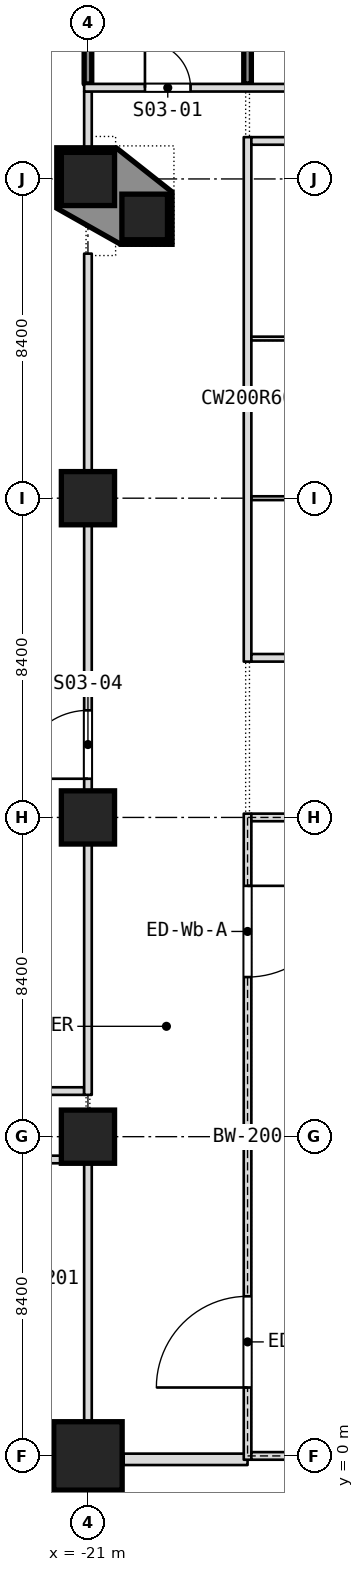
"""IFC4 building model, lengths in metres.
Left out: names, types, materials, properties, quantities, classifications, styles, units other than length and angle.
Written with IfcOpenShell. Run it as: python <this file> out.ifc"""

import sys

from ifc_helpers import new_model, si_unit, direction, frame, frame_2d, origin, origin_2d, place, context, subcontext, project, spatial, polyline, rectangle, outline, extrude, element, fill, save


model = new_model("IFC4")
c1 = context("Model", 3, precision=1e-05, world=origin(), true_north=direction((0.0, 1.0)))
c2 = subcontext(c1, "Body", "Model", "MODEL_VIEW")
j1 = project(units=[si_unit("LENGTHUNIT", "METRE"), si_unit("PLANEANGLEUNIT", "RADIAN")], contexts=[c1])
p1 = place(None, origin())
s1 = spatial("IfcSite", under=j1, at=p1, CompositionType="ELEMENT")
p2 = place(p1, origin())
s2 = spatial("IfcBuilding", under=s1, at=p2, CompositionType="ELEMENT")
p3 = place(p2, frame((0.0, 0.0, 13.0)))
s3 = spatial("IfcBuildingStorey", under=s2, at=p3, CompositionType="ELEMENT", Elevation=13.0)
p4 = place(p3, frame((-21.0, 0.0, 0.0), z_axis=(0.0, 0.0, 1.0), x_axis=(1.0, 0.0, 0.0)))
e1 = element("IfcColumn", 1, at=p4, inside=s3, PredefinedType="COLUMN", context=c2, shape_type="SweptSolid", body=[
    extrude(rectangle(XDim=1.8, YDim=1.8, at=origin_2d()), origin(), (0.0, 0.0, 1.0), 8.0),
])
for number, where, z_axis, x_axis in (
    (2, (-21.0, 8.4, 0.0), (0.0, 0.0, 1.0), (1.0, 0.0, 0.0)),
    (3, (-21.0, 16.8, 0.0), (0.0, 0.0, 1.0), (1.0, 0.0, 0.0)),
    (4, (-21.0, 25.2, 0.0), (0.0, 0.0, 1.0), (1.0, 0.0, 0.0)),
    (5, (-21.0, 33.6, 0.0), (0.0, 0.0, 1.0), (1.0, 0.0, 0.0)),
):
    element("IfcColumn", number, at=place(p3, frame(where, z_axis=z_axis, x_axis=x_axis)), inside=s3, PredefinedType="COLUMN", context=c2, shape_type="SweptSolid", body=[
        extrude(rectangle(XDim=1.4, YDim=1.4, at=origin_2d()), origin(), (0.0, 0.0, 1.0), 8.0),
    ])
p5 = place(p3, frame((-19.507, 32.6, 0.0), z_axis=(0.0, 0.0, 1.0), x_axis=(1.0, 0.0, 0.0)))
e6 = element("IfcColumn", 6, at=p5, inside=s3, PredefinedType="COLUMN", context=c2, shape_type="SweptSolid", body=[
    extrude(rectangle(XDim=1.2, YDim=1.2, at=origin_2d()), origin(), (0.0, 0.0, 1.0), 8.0),
])
p6 = place(p3, frame((-38.1, 7.8, 0.0), z_axis=(0.0, 0.0, 1.0), x_axis=(1.0, 0.0, 0.0)))
e7 = element("IfcWall", 7, at=p6, inside=s3, PredefinedType="PARTITIONING", context=c2, shape_type="SweptSolid", body=[
    extrude(rectangle(XDim=17.0, YDim=0.2, at=frame_2d((8.5, 0.0))), origin(), (0.0, 0.0, 1.0), 7.68),
])
p7 = place(p6, frame((11.125, 0.0, 0.0)))
e8 = element("IfcOpeningElement", 8, at=p7, cuts=e7, PredefinedType="OPENING", context=c2, shape_type="SweptSolid", body=[
    extrude(rectangle(XDim=1.8, YDim=2.1, at=frame_2d((0.9, 1.05))), frame((0.0, 0.1, 0.0), z_axis=(0.0, -1.0, 0.0), x_axis=(1.0, 0.0, 0.0)), (0.0, 0.0, 1.0), 0.2),
])
p8 = place(p3, frame((-27.3, 9.6, 0.0), z_axis=(0.0, 0.0, 1.0), x_axis=(1.0, 0.0, 0.0)))
e9 = element("IfcWall", 9, at=p8, inside=s3, PredefinedType="PARTITIONING", context=c2, shape_type="SweptSolid", body=[
    extrude(rectangle(XDim=6.2, YDim=0.2, at=frame_2d((3.1, 0.0))), origin(), (0.0, 0.0, 1.0), 7.68),
])
p9 = place(p3, frame((-16.8, 20.9, 0.0), z_axis=(0.0, 0.0, 1.0), x_axis=(0.0, 1.0, 0.0)))
e10 = element("IfcWall", 10, at=p9, inside=s3, PredefinedType="PARTITIONING", context=c2, shape_type="SweptSolid", body=[
    extrude(rectangle(XDim=13.8, YDim=0.2, at=frame_2d((6.9, 0.0))), origin(), (0.0, 0.0, 1.0), 7.68),
])
p10 = place(p3, frame((-16.8, 36.1, 0.0), z_axis=(0.0, 0.0, 1.0), x_axis=(0.0, 1.0, 0.0)))
e11 = element("IfcWall", 11, at=p10, inside=s3, PredefinedType="PARTITIONING", context=c2, shape_type="SweptSolid", body=[
    extrude(rectangle(XDim=5.84, YDim=0.2, at=frame_2d((2.92, 0.0))), origin(), (0.0, 0.0, 1.0), 7.68),
])
p11 = place(p3, frame((-21.0, -0.3, 0.0), z_axis=(0.0, 0.0, 1.0), x_axis=(0.0, 1.0, 0.0)))
e12 = element("IfcWall", 12, at=p11, inside=s3, PredefinedType="PARTITIONING", context=c2, shape_type="SweptSolid", body=[
    extrude(rectangle(XDim=8.2, YDim=0.2, at=frame_2d((4.1, 0.0))), origin(), (0.0, 0.0, 1.0), 7.68),
])
p12 = place(p3, frame((-21.0, 9.5, 0.0), z_axis=(0.0, 0.0, 1.0), x_axis=(0.0, 1.0, 0.0)))
e13 = element("IfcWall", 13, at=p12, inside=s3, PredefinedType="PARTITIONING", context=c2, shape_type="SweptSolid", body=[
    extrude(rectangle(XDim=22.135, YDim=0.2, at=frame_2d((11.067, 0.0))), origin(), (0.0, 0.0, 1.0), 7.68),
])
p13 = place(p12, frame((8.318, 0.0, 0.0)))
e14 = element("IfcOpeningElement", 14, at=p13, cuts=e13, PredefinedType="OPENING", context=c2, shape_type="SweptSolid", body=[
    extrude(rectangle(XDim=1.8, YDim=2.1, at=frame_2d((0.9, 1.05))), frame((0.0, 0.1, 0.0), z_axis=(0.0, -1.0, 0.0), x_axis=(1.0, 0.0, 0.0)), (0.0, 0.0, 1.0), 0.2),
])
p14 = place(p3, frame((-21.0, 34.42, 0.0), z_axis=(0.0, 0.0, 1.0), x_axis=(0.0, 1.0, 0.0)))
e15 = element("IfcWall", 15, at=p14, inside=s3, PredefinedType="PARTITIONING", context=c2, shape_type="SweptSolid", body=[
    extrude(rectangle(XDim=1.48, YDim=0.2, at=frame_2d((0.74, 0.0))), origin(), (0.0, 0.0, 1.0), 7.68),
])
p15 = place(p3, frame((-21.0, 36.1, 0.0), z_axis=(0.0, 0.0, 1.0), x_axis=(0.0, 1.0, 0.0)))
e16 = element("IfcWall", 16, at=p15, inside=s3, PredefinedType="PARTITIONING", context=c2, shape_type="SweptSolid", body=[
    extrude(rectangle(XDim=6.2, YDim=0.2, at=frame_2d((3.1, 0.0))), origin(), (0.0, 0.0, 1.0), 7.68),
])
p16 = place(p3, frame((-16.7, 21.0, 0.0), z_axis=(0.0, 0.0, 1.0), x_axis=(1.0, 0.0, 0.0)))
e17 = element("IfcWall", 17, at=p16, inside=s3, PredefinedType="PARTITIONING", context=c2, shape_type="SweptSolid", body=[
    extrude(rectangle(XDim=33.4, YDim=0.2, at=frame_2d((16.7, 0.0))), origin(), (0.0, 0.0, 1.0), 7.68),
])
p17 = place(p16, frame((15.8, 0.0, 0.0)))
e18 = element("IfcOpeningElement", 18, at=p17, cuts=e17, PredefinedType="OPENING", context=c2, shape_type="SweptSolid", body=[
    extrude(rectangle(XDim=1.8, YDim=2.1, at=frame_2d((0.9, 1.05))), frame((0.0, 0.1, 0.0), z_axis=(0.0, -1.0, 0.0), x_axis=(1.0, 0.0, 0.0)), (0.0, 0.0, 1.0), 0.2),
])
p18 = place(p3, frame((-16.7, 25.2, 0.0), z_axis=(0.0, 0.0, 1.0), x_axis=(1.0, 0.0, 0.0)))
e19 = element("IfcWall", 19, at=p18, inside=s3, PredefinedType="PARTITIONING", context=c2, shape_type="SweptSolid", body=[
    extrude(rectangle(XDim=3.38, YDim=0.1, at=frame_2d((1.69, 0.0))), origin(), (0.0, 0.0, 1.0), 7.68),
])
p19 = place(p3, frame((-16.7, 29.4, 0.0), z_axis=(0.0, 0.0, 1.0), x_axis=(1.0, 0.0, 0.0)))
e20 = element("IfcWall", 20, at=p19, inside=s3, PredefinedType="PARTITIONING", context=c2, shape_type="SweptSolid", body=[
    extrude(rectangle(XDim=33.4, YDim=0.1, at=frame_2d((16.7, 0.0))), origin(), (0.0, 0.0, 1.0), 7.68),
])
p20 = place(p19, frame((16.2, 0.0, 0.0)))
e21 = element("IfcOpeningElement", 21, at=p20, cuts=e20, PredefinedType="OPENING", context=c2, shape_type="SweptSolid", body=[
    extrude(rectangle(XDim=1.0, YDim=2.1, at=frame_2d((0.5, 1.05))), frame((0.0, 0.05, 0.0), z_axis=(0.0, -1.0, 0.0), x_axis=(1.0, 0.0, 0.0)), (0.0, 0.0, 1.0), 0.1),
])
p21 = place(p3, frame((-16.7, 34.6, 0.0), z_axis=(0.0, 0.0, 1.0), x_axis=(1.0, 0.0, 0.0)))
e22 = element("IfcWall", 22, at=p21, inside=s3, PredefinedType="PARTITIONING", context=c2, shape_type="SweptSolid", body=[
    extrude(rectangle(XDim=3.23, YDim=0.2, at=frame_2d((1.615, 0.0))), origin(), (0.0, 0.0, 1.0), 7.68),
])
p22 = place(p3, frame((-21.1, 36.0, 0.0), z_axis=(0.0, 0.0, 1.0), x_axis=(1.0, 0.0, 0.0)))
e23 = element("IfcWall", 23, at=p22, inside=s3, PredefinedType="PARTITIONING", context=c2, shape_type="SweptSolid", body=[
    extrude(rectangle(XDim=23.3, YDim=0.2, at=frame_2d((11.65, 0.0))), origin(), (0.0, 0.0, 1.0), 7.68),
])
p23 = place(p22, frame((1.6, 0.0, 0.0)))
e24 = element("IfcOpeningElement", 24, at=p23, cuts=e23, PredefinedType="OPENING", context=c2, shape_type="SweptSolid", body=[
    extrude(rectangle(XDim=1.2, YDim=2.1, at=frame_2d((0.6, 1.05))), frame((0.0, 0.1, 0.0), z_axis=(0.0, -1.0, 0.0), x_axis=(1.0, 0.0, 0.0)), (0.0, 0.0, 1.0), 0.2),
])
p24 = place(p22, frame((11.15, 0.0, 0.0)))
e25 = element("IfcOpeningElement", 25, at=p24, cuts=e23, PredefinedType="OPENING", context=c2, shape_type="SweptSolid", body=[
    extrude(rectangle(XDim=1.0, YDim=2.1, at=frame_2d((0.5, 1.05))), frame((0.0, 0.1, 0.0), z_axis=(0.0, -1.0, 0.0), x_axis=(1.0, 0.0, 0.0)), (0.0, 0.0, 1.0), 0.2),
])
p25 = place(p22, frame((20.5, 0.0, 0.0)))
e26 = element("IfcOpeningElement", 26, at=p25, cuts=e23, PredefinedType="OPENING", context=c2, shape_type="SweptSolid", body=[
    extrude(rectangle(XDim=1.2, YDim=2.1, at=frame_2d((0.6, 1.05))), frame((0.0, 0.1, 0.0), z_axis=(0.0, -1.0, 0.0), x_axis=(1.0, 0.0, 0.0)), (0.0, 0.0, 1.0), 0.2),
])
p26 = place(p3, frame((-26.423, -0.09, 0.0), z_axis=(0.0, 0.0, 1.0), x_axis=(1.0, 0.0, 0.0)))
e27 = element("IfcWall", 27, at=p26, inside=s3, PredefinedType="NOTDEFINED", context=c2, shape_type="SweptSolid", body=[
    extrude(rectangle(XDim=4.483, YDim=0.3, at=frame_2d((2.242, 0.0))), origin(), (0.0, 0.0, 1.0), 6.78),
])
p27 = place(p3, frame((-20.06, -0.09, 0.0), z_axis=(0.0, 0.0, 1.0), x_axis=(1.0, 0.0, 0.0)))
e28 = element("IfcWall", 28, at=p27, inside=s3, PredefinedType="NOTDEFINED", context=c2, shape_type="SweptSolid", body=[
    extrude(rectangle(XDim=3.26, YDim=0.3, at=frame_2d((1.63, 0.0))), origin(), (0.0, 0.0, 1.0), 8.0),
])
p28 = place(p3, frame((-16.8, -0.1, 0.0), z_axis=(0.0, 0.0, 1.0), x_axis=(0.0, 1.0, 0.0)))
e29 = element("IfcWall", 29, at=p28, inside=s3, PredefinedType="PARTITIONING", context=c2, shape_type="SweptSolid", body=[
    extrude(rectangle(XDim=17.0, YDim=0.2, at=frame_2d((8.5, 0.0))), origin(), (0.0, 0.0, 1.0), 7.78),
])
p29 = place(p28, frame((1.9, 0.0, 0.0)))
e30 = element("IfcOpeningElement", 30, at=p29, cuts=e29, PredefinedType="OPENING", context=c2, shape_type="SweptSolid", body=[
    extrude(rectangle(XDim=2.4, YDim=2.1, at=frame_2d((1.2, 1.05))), frame((0.0, 0.1, 0.0), z_axis=(0.0, -1.0, 0.0), x_axis=(1.0, 0.0, 0.0)), (0.0, 0.0, 1.0), 0.2),
])
p30 = place(p28, frame((12.7, 0.0, 0.0)))
e31 = element("IfcOpeningElement", 31, at=p30, cuts=e29, PredefinedType="OPENING", context=c2, shape_type="SweptSolid", body=[
    extrude(rectangle(XDim=2.4, YDim=2.1, at=frame_2d((1.2, 1.05))), frame((0.0, 0.1, 0.0), z_axis=(0.0, -1.0, 0.0), x_axis=(1.0, 0.0, 0.0)), (0.0, 0.0, 1.0), 0.2),
])
for number, where, z_axis, x_axis in (
    (32, (-16.7, 0.0, 0.0), (0.0, 0.0, 1.0), (1.0, 0.0, 0.0)),
    (33, (-16.7, 16.8, 0.0), (0.0, 0.0, 1.0), (1.0, 0.0, 0.0)),
):
    element("IfcWall", number, at=place(p3, frame(where, z_axis=z_axis, x_axis=x_axis)), inside=s3, PredefinedType="PARTITIONING", context=c2, shape_type="SweptSolid", body=[
        extrude(rectangle(XDim=4.1, YDim=0.2, at=frame_2d((2.05, 0.0))), origin(), (0.0, 0.0, 1.0), 7.78),
    ])
p31 = place(p3, origin())
e34 = element("IfcWall", 34, at=p31, inside=s3, PredefinedType="SOLIDWALL", context=c2, shape_type="SweptSolid", body=[
    extrude(outline(polyline([(-21.82, 34.42), (-20.258, 34.42), (-18.787, 33.258), (-18.787, 31.88), (-20.138, 31.88), (-21.82, 32.83), (-21.82, 34.42)]), holes=[polyline([(-18.907, 32.0), (-18.907, 33.2), (-20.107, 33.2), (-20.107, 32.0), (-18.907, 32.0)]), polyline([(-20.3, 32.9), (-20.3, 34.3), (-21.7, 34.3), (-21.7, 32.9), (-20.3, 32.9)])]), origin(), (0.0, 0.0, 1.0), 8.0),
])
p32 = place(p23, origin())
e35 = element("IfcDoor", 35, at=p32, inside=s3, OperationType="SINGLE_SWING_RIGHT", PredefinedType="DOOR", context=c2, shape_type="SweptSolid", body=[
    extrude(rectangle(XDim=1.2, YDim=2.1, at=frame_2d((0.6, 1.05))), frame((0.0, 0.025, 0.0), z_axis=(0.0, -1.0, 0.0), x_axis=(1.0, 0.0, 0.0)), (0.0, 0.0, 1.0), 0.05),
])
fill(e24, e35)
p33 = place(p13, origin())
e36 = element("IfcDoor", 36, at=p33, inside=s3, OperationType="DOUBLE_DOOR_SINGLE_SWING", PredefinedType="DOOR", context=c2, shape_type="SweptSolid", body=[
    extrude(rectangle(XDim=1.8, YDim=2.1, at=frame_2d((0.9, 1.05))), frame((0.0, 0.025, 0.0), z_axis=(0.0, -1.0, 0.0), x_axis=(1.0, 0.0, 0.0)), (0.0, 0.0, 1.0), 0.05),
])
fill(e14, e36)
p34 = place(p29, origin())
e37 = element("IfcDoor", 37, at=p34, inside=s3, OperationType="DOUBLE_DOOR_SINGLE_SWING", PredefinedType="DOOR", context=c2, shape_type="SweptSolid", body=[
    extrude(rectangle(XDim=2.4, YDim=2.1, at=frame_2d((1.2, 1.05))), frame((0.0, 0.025, 0.0), z_axis=(0.0, -1.0, 0.0), x_axis=(1.0, 0.0, 0.0)), (0.0, 0.0, 1.0), 0.05),
])
fill(e30, e37)
p35 = place(p30, origin())
e38 = element("IfcDoor", 38, at=p35, inside=s3, OperationType="DOUBLE_DOOR_SINGLE_SWING", PredefinedType="DOOR", context=c2, shape_type="SweptSolid", body=[
    extrude(rectangle(XDim=2.4, YDim=2.1, at=frame_2d((1.2, 1.05))), frame((0.0, 0.025, 0.0), z_axis=(0.0, -1.0, 0.0), x_axis=(1.0, 0.0, 0.0)), (0.0, 0.0, 1.0), 0.05),
])
fill(e31, e38)
save(model, sys.argv[1])
